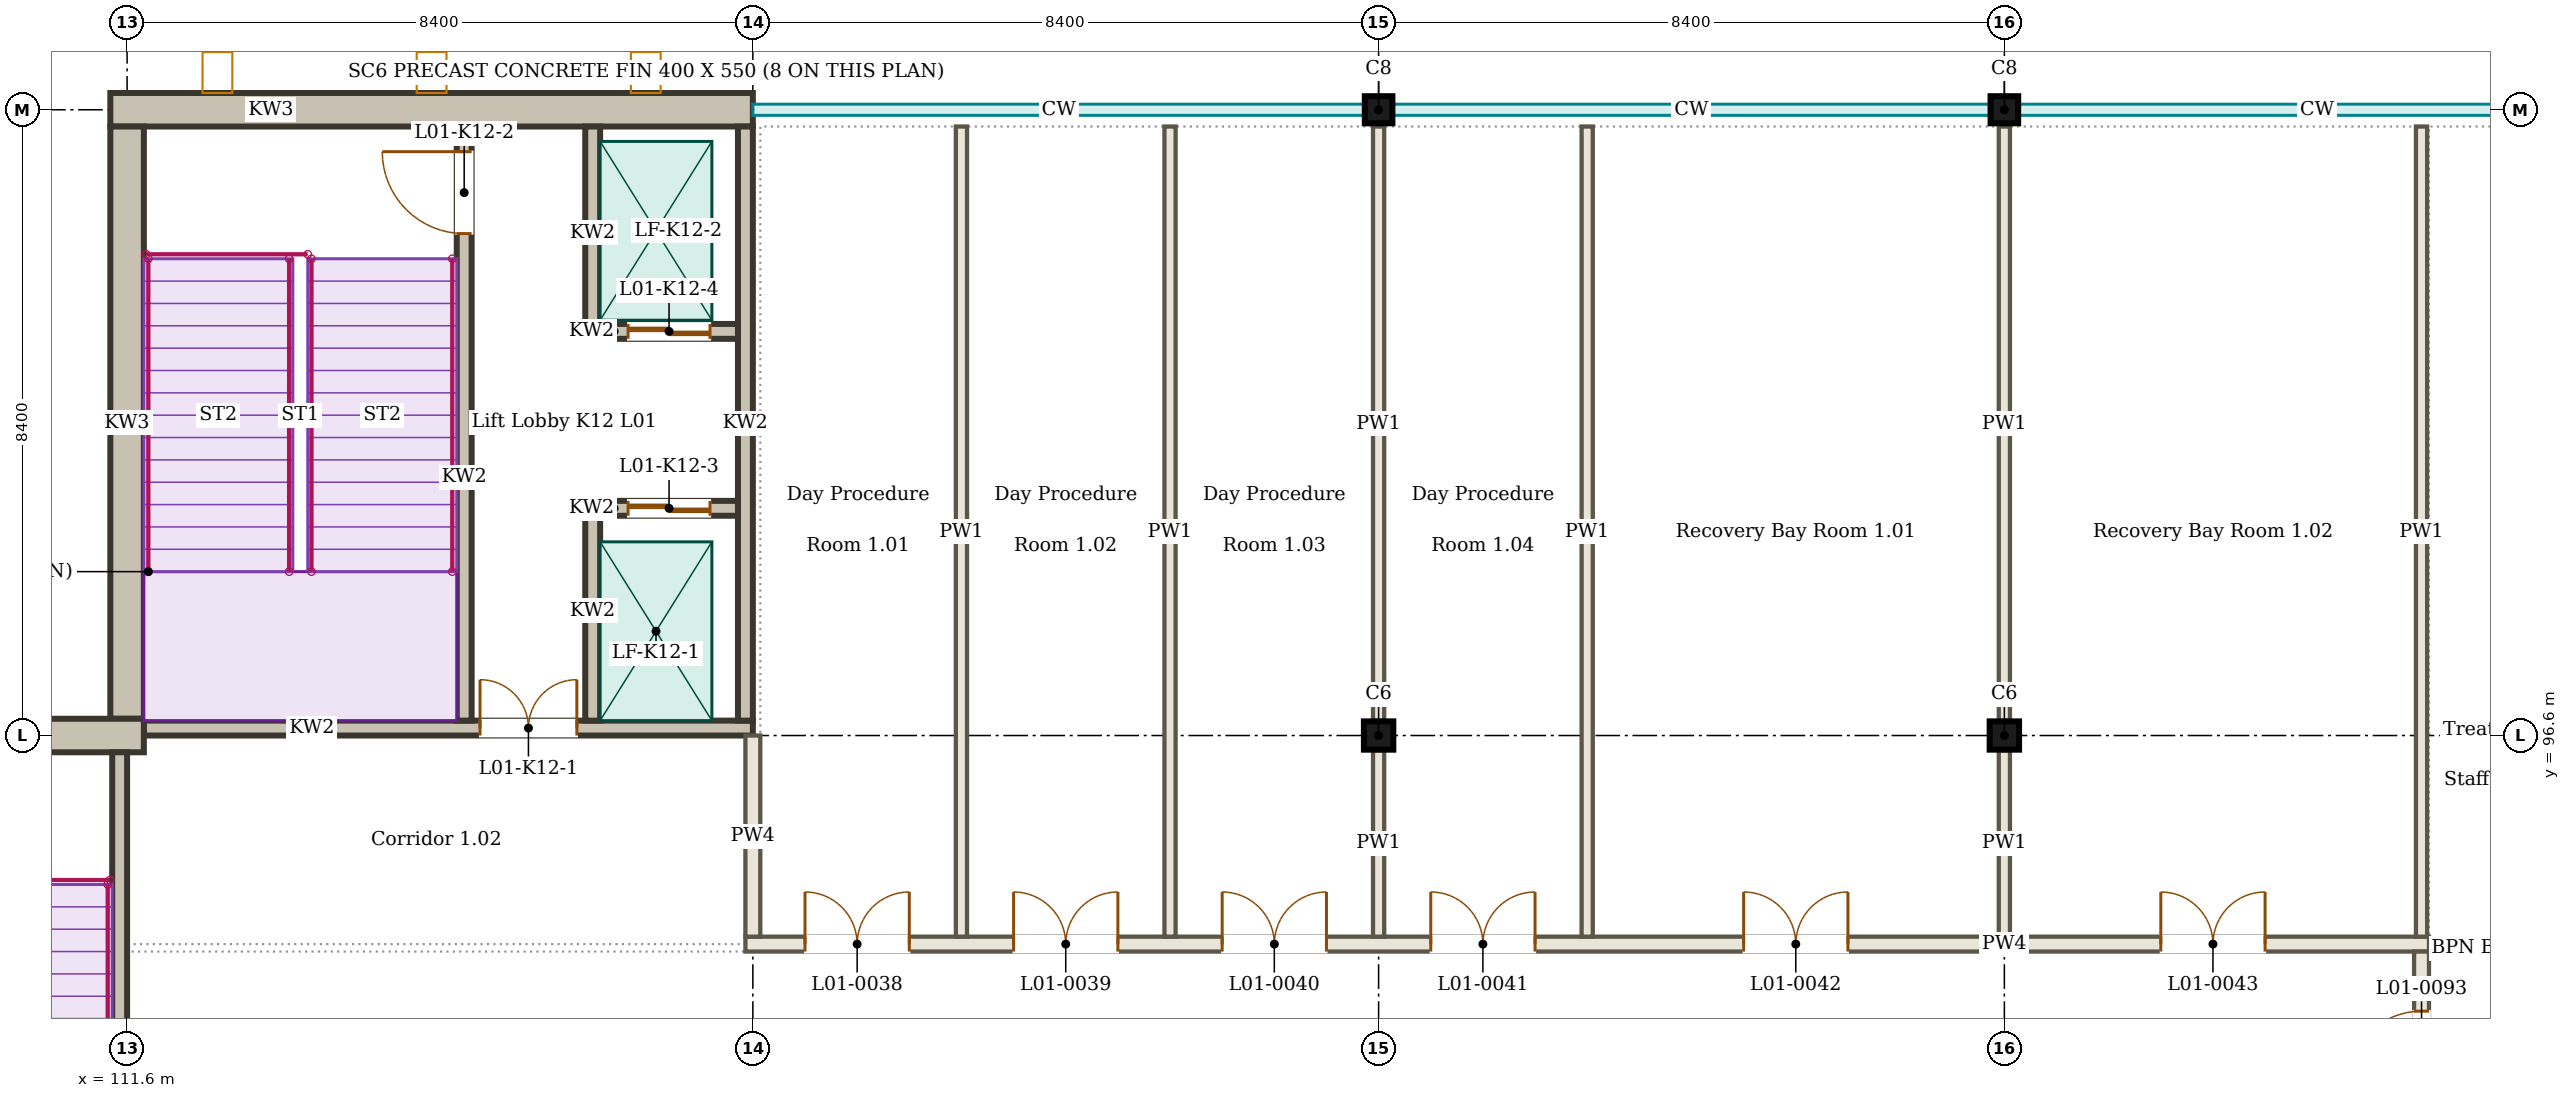
"""IFC4 building model, lengths in metres.
Left out: names, types, materials, properties, quantities, classifications, styles, units other than length and angle.
Written with IfcOpenShell. Run it as: python <this file> out.ifc"""

import sys

from ifc_helpers import new_model, si_unit, direction, frame, frame_2d, origin, origin_2d, place, context, subcontext, project, spatial, rectangle, i_section, extrude, element, fill, save


model = new_model("IFC4")
c1 = context("Model", 3, precision=1e-05, world=origin(), true_north=direction((0.0, 1.0)))
c2 = subcontext(c1, "Body", "Model", "MODEL_VIEW")
j1 = project(units=[si_unit("LENGTHUNIT", "METRE"), si_unit("PLANEANGLEUNIT", "RADIAN")], contexts=[c1])
p1 = place(None, origin())
s1 = spatial("IfcSite", under=j1, at=p1, CompositionType="ELEMENT")
p2 = place(p1, origin())
s2 = spatial("IfcBuilding", under=s1, at=p2, CompositionType="ELEMENT")
p3 = place(p2, frame((0.0, 0.0, 4.5)))
s3 = spatial("IfcBuildingStorey", under=s2, at=p3, CompositionType="ELEMENT", Elevation=4.5)
for number, where, z_axis, x_axis in (
    (1, (128.4, 96.6, 0.0), (0.0, 0.0, 1.0), (1.0, 0.0, 0.0)),
    (2, (136.8, 96.6, 0.0), (0.0, 0.0, 1.0), (1.0, 0.0, 0.0)),
):
    element("IfcColumn", number, at=place(p3, frame(where, z_axis=z_axis, x_axis=x_axis)), inside=s3, PredefinedType="COLUMN", context=c2, shape_type="SweptSolid", body=[
        extrude(i_section(OverallWidth=0.395, OverallDepth=0.38, WebThickness=0.019, FlangeThickness=0.03, FilletRadius=0.027, at=origin_2d()), origin(), (0.0, 0.0, 1.0), 4.5),
    ])
for number, where, z_axis, x_axis in (
    (3, (128.4, 105.0, 0.0), (0.0, 0.0, 1.0), (1.0, 0.0, 0.0)),
    (4, (136.8, 105.0, 0.0), (0.0, 0.0, 1.0), (1.0, 0.0, 0.0)),
):
    element("IfcColumn", number, at=place(p3, frame(where, z_axis=z_axis, x_axis=x_axis)), inside=s3, PredefinedType="COLUMN", context=c2, shape_type="SweptSolid", body=[
        extrude(i_section(OverallWidth=0.371, OverallDepth=0.364, WebThickness=0.013, FlangeThickness=0.022, FilletRadius=0.027, at=origin_2d()), origin(), (0.0, 0.0, 1.0), 4.5),
    ])
p4 = place(p3, frame((136.8, 105.16, 3.87), z_axis=(0.0, 0.0, 1.0), x_axis=(1.0, 0.0, 0.0)))
e5 = element("IfcWall", 5, at=p4, inside=s3, PredefinedType="SOLIDWALL", context=c2, shape_type="SweptSolid", body=[
    extrude(rectangle(XDim=8.4, YDim=0.13, at=frame_2d((4.2, 0.0))), origin(), (0.0, 0.0, 1.0), 0.63),
])
p5 = place(p3, frame((119.9, 93.8, 0.0), z_axis=(0.0, 0.0, 1.0), x_axis=(1.0, 0.0, 0.0)))
e6 = element("IfcWall", 6, at=p5, inside=s3, PredefinedType="PARTITIONING", context=c2, shape_type="SweptSolid", body=[
    extrude(rectangle(XDim=22.6, YDim=0.2, at=frame_2d((11.3, 0.0))), origin(), (0.0, 0.0, 1.0), 3.8),
])
p6 = place(p5, frame((0.8, 0.0, 0.0)))
e7 = element("IfcOpeningElement", 7, at=p6, cuts=e6, PredefinedType="OPENING", context=c2, shape_type="SweptSolid", body=[
    extrude(rectangle(XDim=1.4, YDim=2.1, at=frame_2d((0.7, 1.05))), frame((0.0, 0.11, 0.0), z_axis=(0.0, -1.0, 0.0), x_axis=(1.0, 0.0, 0.0)), (0.0, 0.0, 1.0), 0.22),
])
p7 = place(p5, frame((3.6, 0.0, 0.0)))
e8 = element("IfcOpeningElement", 8, at=p7, cuts=e6, PredefinedType="OPENING", context=c2, shape_type="SweptSolid", body=[
    extrude(rectangle(XDim=1.4, YDim=2.1, at=frame_2d((0.7, 1.05))), frame((0.0, 0.11, 0.0), z_axis=(0.0, -1.0, 0.0), x_axis=(1.0, 0.0, 0.0)), (0.0, 0.0, 1.0), 0.22),
])
p8 = place(p5, frame((6.4, 0.0, 0.0)))
e9 = element("IfcOpeningElement", 9, at=p8, cuts=e6, PredefinedType="OPENING", context=c2, shape_type="SweptSolid", body=[
    extrude(rectangle(XDim=1.4, YDim=2.1, at=frame_2d((0.7, 1.05))), frame((0.0, 0.11, 0.0), z_axis=(0.0, -1.0, 0.0), x_axis=(1.0, 0.0, 0.0)), (0.0, 0.0, 1.0), 0.22),
])
p9 = place(p5, frame((9.2, 0.0, 0.0)))
e10 = element("IfcOpeningElement", 10, at=p9, cuts=e6, PredefinedType="OPENING", context=c2, shape_type="SweptSolid", body=[
    extrude(rectangle(XDim=1.4, YDim=2.1, at=frame_2d((0.7, 1.05))), frame((0.0, 0.11, 0.0), z_axis=(0.0, -1.0, 0.0), x_axis=(1.0, 0.0, 0.0)), (0.0, 0.0, 1.0), 0.22),
])
p10 = place(p5, frame((13.4, 0.0, 0.0)))
e11 = element("IfcOpeningElement", 11, at=p10, cuts=e6, PredefinedType="OPENING", context=c2, shape_type="SweptSolid", body=[
    extrude(rectangle(XDim=1.4, YDim=2.1, at=frame_2d((0.7, 1.05))), frame((0.0, 0.11, 0.0), z_axis=(0.0, -1.0, 0.0), x_axis=(1.0, 0.0, 0.0)), (0.0, 0.0, 1.0), 0.22),
])
p11 = place(p5, frame((19.0, 0.0, 0.0)))
e12 = element("IfcOpeningElement", 12, at=p11, cuts=e6, PredefinedType="OPENING", context=c2, shape_type="SweptSolid", body=[
    extrude(rectangle(XDim=1.4, YDim=2.1, at=frame_2d((0.7, 1.05))), frame((0.0, 0.11, 0.0), z_axis=(0.0, -1.0, 0.0), x_axis=(1.0, 0.0, 0.0)), (0.0, 0.0, 1.0), 0.22),
])
p12 = place(p3, frame((120.0, 93.9, 0.0), z_axis=(0.0, 0.0, 1.0), x_axis=(0.0, 1.0, 0.0)))
e13 = element("IfcWall", 13, at=p12, inside=s3, PredefinedType="PARTITIONING", context=c2, shape_type="SweptSolid", body=[
    extrude(rectangle(XDim=2.7, YDim=0.2, at=frame_2d((1.35, 0.0))), origin(), (0.0, 0.0, 1.0), 3.8),
])
for number, where, z_axis, x_axis in (
    (14, (122.8, 93.9, 0.0), (0.0, 0.0, 1.0), (0.0, 1.0, 0.0)),
    (15, (125.6, 93.9, 0.0), (0.0, 0.0, 1.0), (0.0, 1.0, 0.0)),
):
    element("IfcWall", number, at=place(p3, frame(where, z_axis=z_axis, x_axis=x_axis)), inside=s3, PredefinedType="PARTITIONING", context=c2, shape_type="SweptSolid", body=[
        extrude(rectangle(XDim=10.875, YDim=0.15, at=frame_2d((5.438, 0.0))), origin(), (0.0, 0.0, 1.0), 3.8),
    ])
p13 = place(p3, frame((128.4, 93.9, 0.0), z_axis=(0.0, 0.0, 1.0), x_axis=(0.0, 1.0, 0.0)))
e16 = element("IfcWall", 16, at=p13, inside=s3, PredefinedType="PARTITIONING", context=c2, shape_type="SweptSolid", body=[
    extrude(rectangle(XDim=2.503, YDim=0.15, at=frame_2d((1.251, 0.0))), origin(), (0.0, 0.0, 1.0), 3.8),
])
p14 = place(p3, frame((128.4, 96.798, 0.0), z_axis=(0.0, 0.0, 1.0), x_axis=(0.0, 1.0, 0.0)))
e17 = element("IfcWall", 17, at=p14, inside=s3, PredefinedType="PARTITIONING", context=c2, shape_type="SweptSolid", body=[
    extrude(rectangle(XDim=7.977, YDim=0.15, at=frame_2d((3.989, 0.0))), origin(), (0.0, 0.0, 1.0), 3.8),
])
p15 = place(p3, frame((131.2, 93.9, 0.0), z_axis=(0.0, 0.0, 1.0), x_axis=(0.0, 1.0, 0.0)))
e18 = element("IfcWall", 18, at=p15, inside=s3, PredefinedType="PARTITIONING", context=c2, shape_type="SweptSolid", body=[
    extrude(rectangle(XDim=10.875, YDim=0.15, at=frame_2d((5.438, 0.0))), origin(), (0.0, 0.0, 1.0), 3.8),
])
p16 = place(p3, frame((136.8, 93.9, 0.0), z_axis=(0.0, 0.0, 1.0), x_axis=(0.0, 1.0, 0.0)))
e19 = element("IfcWall", 19, at=p16, inside=s3, PredefinedType="PARTITIONING", context=c2, shape_type="SweptSolid", body=[
    extrude(rectangle(XDim=2.503, YDim=0.15, at=frame_2d((1.251, 0.0))), origin(), (0.0, 0.0, 1.0), 3.8),
])
p17 = place(p3, frame((136.8, 96.798, 0.0), z_axis=(0.0, 0.0, 1.0), x_axis=(0.0, 1.0, 0.0)))
e20 = element("IfcWall", 20, at=p17, inside=s3, PredefinedType="PARTITIONING", context=c2, shape_type="SweptSolid", body=[
    extrude(rectangle(XDim=7.977, YDim=0.15, at=frame_2d((3.989, 0.0))), origin(), (0.0, 0.0, 1.0), 3.8),
])
p18 = place(p3, frame((142.4, 91.1, 0.0), z_axis=(0.0, 0.0, 1.0), x_axis=(0.0, 1.0, 0.0)))
e21 = element("IfcWall", 21, at=p18, inside=s3, PredefinedType="PARTITIONING", context=c2, shape_type="SweptSolid", body=[
    extrude(rectangle(XDim=2.6, YDim=0.2, at=frame_2d((1.3, 0.0))), origin(), (0.0, 0.0, 1.0), 3.95),
])
p19 = place(p18, frame((0.8, 0.0, 0.0)))
e22 = element("IfcOpeningElement", 22, at=p19, cuts=e21, PredefinedType="OPENING", context=c2, shape_type="SweptSolid", body=[
    extrude(rectangle(XDim=1.0, YDim=2.1, at=frame_2d((0.5, 1.05))), frame((0.0, 0.11, 0.0), z_axis=(0.0, -1.0, 0.0), x_axis=(1.0, 0.0, 0.0)), (0.0, 0.0, 1.0), 0.22),
])
p20 = place(p3, frame((142.4, 93.9, 0.0), z_axis=(0.0, 0.0, 1.0), x_axis=(0.0, 1.0, 0.0)))
e23 = element("IfcWall", 23, at=p20, inside=s3, PredefinedType="PARTITIONING", context=c2, shape_type="SweptSolid", body=[
    extrude(rectangle(XDim=10.875, YDim=0.15, at=frame_2d((5.438, 0.0))), origin(), (0.0, 0.0, 1.0), 3.8),
])
p21 = place(p3, frame((111.825, 96.6, 0.0), z_axis=(0.0, 0.0, 1.0), x_axis=(-1.0, 0.0, 0.0)))
e24 = element("IfcWall", 24, at=p21, inside=s3, PredefinedType="SOLIDWALL", context=c2, shape_type="SweptSolid", body=[
    extrude(rectangle(XDim=8.625, YDim=0.45, at=frame_2d((4.312, 0.0))), origin(), (0.0, 0.0, 1.0), 4.5),
])
p22 = place(p3, frame((111.5, 88.4, 0.0), z_axis=(0.0, 0.0, 1.0), x_axis=(0.0, 1.0, 0.0)))
e25 = element("IfcWall", 25, at=p22, inside=s3, PredefinedType="SOLIDWALL", context=c2, shape_type="SweptSolid", body=[
    extrude(rectangle(XDim=7.975, YDim=0.2, at=frame_2d((3.988, 0.0))), origin(), (0.0, 0.0, 1.0), 4.5),
])
p23 = place(p3, frame((111.825, 96.7, 0.0), z_axis=(0.0, 0.0, 1.0), x_axis=(1.0, 0.0, 0.0)))
e26 = element("IfcWall", 26, at=p23, inside=s3, PredefinedType="SOLIDWALL", context=c2, shape_type="SweptSolid", body=[
    extrude(rectangle(XDim=8.175, YDim=0.2, at=frame_2d((4.087, 0.0))), origin(), (0.0, 0.0, 1.0), 4.5),
])
p24 = place(p23, frame((4.512, 0.0, 0.0)))
e27 = element("IfcOpeningElement", 27, at=p24, cuts=e26, PredefinedType="OPENING", context=c2, shape_type="SweptSolid", body=[
    extrude(rectangle(XDim=1.3, YDim=2.1, at=frame_2d((0.65, 1.05))), frame((0.0, 0.11, 0.0), z_axis=(0.0, -1.0, 0.0), x_axis=(1.0, 0.0, 0.0)), (0.0, 0.0, 1.0), 0.22),
])
p25 = place(p3, frame((111.375, 105.0, 0.0), z_axis=(0.0, 0.0, 1.0), x_axis=(1.0, 0.0, 0.0)))
e28 = element("IfcWall", 28, at=p25, inside=s3, PredefinedType="SOLIDWALL", context=c2, shape_type="SweptSolid", body=[
    extrude(rectangle(XDim=8.625, YDim=0.45, at=frame_2d((4.312, 0.0))), origin(), (0.0, 0.0, 1.0), 4.5),
])
p26 = place(p3, frame((111.6, 96.825, 0.0), z_axis=(0.0, 0.0, 1.0), x_axis=(0.0, 1.0, 0.0)))
e29 = element("IfcWall", 29, at=p26, inside=s3, PredefinedType="SOLIDWALL", context=c2, shape_type="SweptSolid", body=[
    extrude(rectangle(XDim=7.95, YDim=0.45, at=frame_2d((3.975, 0.0))), origin(), (0.0, 0.0, 1.0), 4.5),
])
p27 = place(p3, frame((119.9, 96.8, 0.0), z_axis=(0.0, 0.0, 1.0), x_axis=(0.0, 1.0, 0.0)))
e30 = element("IfcWall", 30, at=p27, inside=s3, PredefinedType="SOLIDWALL", context=c2, shape_type="SweptSolid", body=[
    extrude(rectangle(XDim=7.975, YDim=0.2, at=frame_2d((3.987, 0.0))), origin(), (0.0, 0.0, 1.0), 4.5),
])
p28 = place(p3, frame((116.125, 96.8, 0.0), z_axis=(0.0, 0.0, 1.0), x_axis=(0.0, 1.0, 0.0)))
e31 = element("IfcWall", 31, at=p28, inside=s3, PredefinedType="SOLIDWALL", context=c2, shape_type="SweptSolid", body=[
    extrude(rectangle(XDim=7.975, YDim=0.2, at=frame_2d((3.987, 0.0))), origin(), (0.0, 0.0, 1.0), 4.5),
])
p29 = place(p28, frame((6.538, 0.0, 0.0)))
e32 = element("IfcOpeningElement", 32, at=p29, cuts=e31, PredefinedType="OPENING", context=c2, shape_type="SweptSolid", body=[
    extrude(rectangle(XDim=1.1, YDim=2.1, at=frame_2d((0.55, 1.05))), frame((0.0, 0.11, 0.0), z_axis=(0.0, -1.0, 0.0), x_axis=(1.0, 0.0, 0.0)), (0.0, 0.0, 1.0), 0.22),
])
p30 = place(p3, frame((117.85, 96.8, 0.0), z_axis=(0.0, 0.0, 1.0), x_axis=(0.0, 1.0, 0.0)))
e33 = element("IfcWall", 33, at=p30, inside=s3, PredefinedType="SOLIDWALL", context=c2, shape_type="SweptSolid", body=[
    extrude(rectangle(XDim=2.95, YDim=0.2, at=frame_2d((1.475, 0.0))), origin(), (0.0, 0.0, 1.0), 4.5),
])
p31 = place(p3, frame((117.85, 101.925, 0.0), z_axis=(0.0, 0.0, 1.0), x_axis=(0.0, 1.0, 0.0)))
e34 = element("IfcWall", 34, at=p31, inside=s3, PredefinedType="SOLIDWALL", context=c2, shape_type="SweptSolid", body=[
    extrude(rectangle(XDim=2.85, YDim=0.2, at=frame_2d((1.425, 0.0))), origin(), (0.0, 0.0, 1.0), 4.5),
])
p32 = place(p3, frame((117.95, 99.65, 0.0), z_axis=(0.0, 0.0, 1.0), x_axis=(1.0, 0.0, 0.0)))
e35 = element("IfcWall", 35, at=p32, inside=s3, PredefinedType="SOLIDWALL", context=c2, shape_type="SweptSolid", body=[
    extrude(rectangle(XDim=1.85, YDim=0.2, at=frame_2d((0.925, 0.0))), origin(), (0.0, 0.0, 1.0), 4.5),
])
p33 = place(p32, frame((0.375, 0.0, 0.0)))
e36 = element("IfcOpeningElement", 36, at=p33, cuts=e35, PredefinedType="OPENING", context=c2, shape_type="SweptSolid", body=[
    extrude(rectangle(XDim=1.1, YDim=2.1, at=frame_2d((0.55, 1.05))), frame((0.0, 0.11, 0.0), z_axis=(0.0, -1.0, 0.0), x_axis=(1.0, 0.0, 0.0)), (0.0, 0.0, 1.0), 0.22),
])
p34 = place(p3, frame((117.95, 102.025, 0.0), z_axis=(0.0, 0.0, 1.0), x_axis=(1.0, 0.0, 0.0)))
e37 = element("IfcWall", 37, at=p34, inside=s3, PredefinedType="SOLIDWALL", context=c2, shape_type="SweptSolid", body=[
    extrude(rectangle(XDim=1.85, YDim=0.2, at=frame_2d((0.925, 0.0))), origin(), (0.0, 0.0, 1.0), 4.5),
])
p35 = place(p34, frame((0.375, 0.0, 0.0)))
e38 = element("IfcOpeningElement", 38, at=p35, cuts=e37, PredefinedType="OPENING", context=c2, shape_type="SweptSolid", body=[
    extrude(rectangle(XDim=1.1, YDim=2.1, at=frame_2d((0.55, 1.05))), frame((0.0, 0.11, 0.0), z_axis=(0.0, -1.0, 0.0), x_axis=(1.0, 0.0, 0.0)), (0.0, 0.0, 1.0), 0.22),
])
p36 = place(p6, origin())
e39 = element("IfcDoor", 39, at=p36, inside=s3, OperationType="DOUBLE_DOOR_SINGLE_SWING", PredefinedType="DOOR", context=c2, shape_type="SweptSolid", body=[
    extrude(rectangle(XDim=1.4, YDim=2.1, at=frame_2d((0.7, 1.05))), frame((0.0, 0.025, 0.0), z_axis=(0.0, -1.0, 0.0), x_axis=(1.0, 0.0, 0.0)), (0.0, 0.0, 1.0), 0.05),
])
fill(e7, e39)
p37 = place(p7, origin())
e40 = element("IfcDoor", 40, at=p37, inside=s3, OperationType="DOUBLE_DOOR_SINGLE_SWING", PredefinedType="DOOR", context=c2, shape_type="SweptSolid", body=[
    extrude(rectangle(XDim=1.4, YDim=2.1, at=frame_2d((0.7, 1.05))), frame((0.0, 0.025, 0.0), z_axis=(0.0, -1.0, 0.0), x_axis=(1.0, 0.0, 0.0)), (0.0, 0.0, 1.0), 0.05),
])
fill(e8, e40)
p38 = place(p8, origin())
e41 = element("IfcDoor", 41, at=p38, inside=s3, OperationType="DOUBLE_DOOR_SINGLE_SWING", PredefinedType="DOOR", context=c2, shape_type="SweptSolid", body=[
    extrude(rectangle(XDim=1.4, YDim=2.1, at=frame_2d((0.7, 1.05))), frame((0.0, 0.025, 0.0), z_axis=(0.0, -1.0, 0.0), x_axis=(1.0, 0.0, 0.0)), (0.0, 0.0, 1.0), 0.05),
])
fill(e9, e41)
p39 = place(p9, origin())
e42 = element("IfcDoor", 42, at=p39, inside=s3, OperationType="DOUBLE_DOOR_SINGLE_SWING", PredefinedType="DOOR", context=c2, shape_type="SweptSolid", body=[
    extrude(rectangle(XDim=1.4, YDim=2.1, at=frame_2d((0.7, 1.05))), frame((0.0, 0.025, 0.0), z_axis=(0.0, -1.0, 0.0), x_axis=(1.0, 0.0, 0.0)), (0.0, 0.0, 1.0), 0.05),
])
fill(e10, e42)
p40 = place(p10, origin())
e43 = element("IfcDoor", 43, at=p40, inside=s3, OperationType="DOUBLE_DOOR_SINGLE_SWING", PredefinedType="DOOR", context=c2, shape_type="SweptSolid", body=[
    extrude(rectangle(XDim=1.4, YDim=2.1, at=frame_2d((0.7, 1.05))), frame((0.0, 0.025, 0.0), z_axis=(0.0, -1.0, 0.0), x_axis=(1.0, 0.0, 0.0)), (0.0, 0.0, 1.0), 0.05),
])
fill(e11, e43)
p41 = place(p11, origin())
e44 = element("IfcDoor", 44, at=p41, inside=s3, OperationType="DOUBLE_DOOR_SINGLE_SWING", PredefinedType="DOOR", context=c2, shape_type="SweptSolid", body=[
    extrude(rectangle(XDim=1.4, YDim=2.1, at=frame_2d((0.7, 1.05))), frame((0.0, 0.025, 0.0), z_axis=(0.0, -1.0, 0.0), x_axis=(1.0, 0.0, 0.0)), (0.0, 0.0, 1.0), 0.05),
])
fill(e12, e44)
p42 = place(p19, origin())
e45 = element("IfcDoor", 45, at=p42, inside=s3, OperationType="SINGLE_SWING_LEFT", PredefinedType="DOOR", context=c2, shape_type="SweptSolid", body=[
    extrude(rectangle(XDim=1.0, YDim=2.1, at=frame_2d((0.5, 1.05))), frame((0.0, 0.025, 0.0), z_axis=(0.0, -1.0, 0.0), x_axis=(1.0, 0.0, 0.0)), (0.0, 0.0, 1.0), 0.05),
])
fill(e22, e45)
p43 = place(p24, origin())
e46 = element("IfcDoor", 46, at=p43, inside=s3, OperationType="DOUBLE_DOOR_DOUBLE_SWING", PredefinedType="DOOR", context=c2, shape_type="SweptSolid", body=[
    extrude(rectangle(XDim=1.3, YDim=2.1, at=frame_2d((0.65, 1.05))), frame((0.0, 0.025, 0.0), z_axis=(0.0, -1.0, 0.0), x_axis=(1.0, 0.0, 0.0)), (0.0, 0.0, 1.0), 0.05),
])
fill(e27, e46)
p44 = place(p29, origin())
e47 = element("IfcDoor", 47, at=p44, inside=s3, OperationType="SINGLE_SWING_RIGHT", PredefinedType="DOOR", context=c2, shape_type="SweptSolid", body=[
    extrude(rectangle(XDim=1.1, YDim=2.1, at=frame_2d((0.55, 1.05))), frame((0.0, 0.025, 0.0), z_axis=(0.0, -1.0, 0.0), x_axis=(1.0, 0.0, 0.0)), (0.0, 0.0, 1.0), 0.05),
])
fill(e32, e47)
p45 = place(p33, origin())
e48 = element("IfcDoor", 48, at=p45, inside=s3, OperationType="DOUBLE_DOOR_SLIDING", PredefinedType="DOOR", context=c2, shape_type="SweptSolid", body=[
    extrude(rectangle(XDim=1.1, YDim=2.1, at=frame_2d((0.55, 1.05))), frame((0.0, 0.025, 0.0), z_axis=(0.0, -1.0, 0.0), x_axis=(1.0, 0.0, 0.0)), (0.0, 0.0, 1.0), 0.05),
])
fill(e36, e48)
p46 = place(p35, origin())
e49 = element("IfcDoor", 49, at=p46, inside=s3, OperationType="DOUBLE_DOOR_SLIDING", PredefinedType="DOOR", context=c2, shape_type="SweptSolid", body=[
    extrude(rectangle(XDim=1.1, YDim=2.1, at=frame_2d((0.55, 1.05))), frame((0.0, 0.025, 0.0), z_axis=(0.0, -1.0, 0.0), x_axis=(1.0, 0.0, 0.0)), (0.0, 0.0, 1.0), 0.05),
])
fill(e38, e49)
save(model, sys.argv[1])
